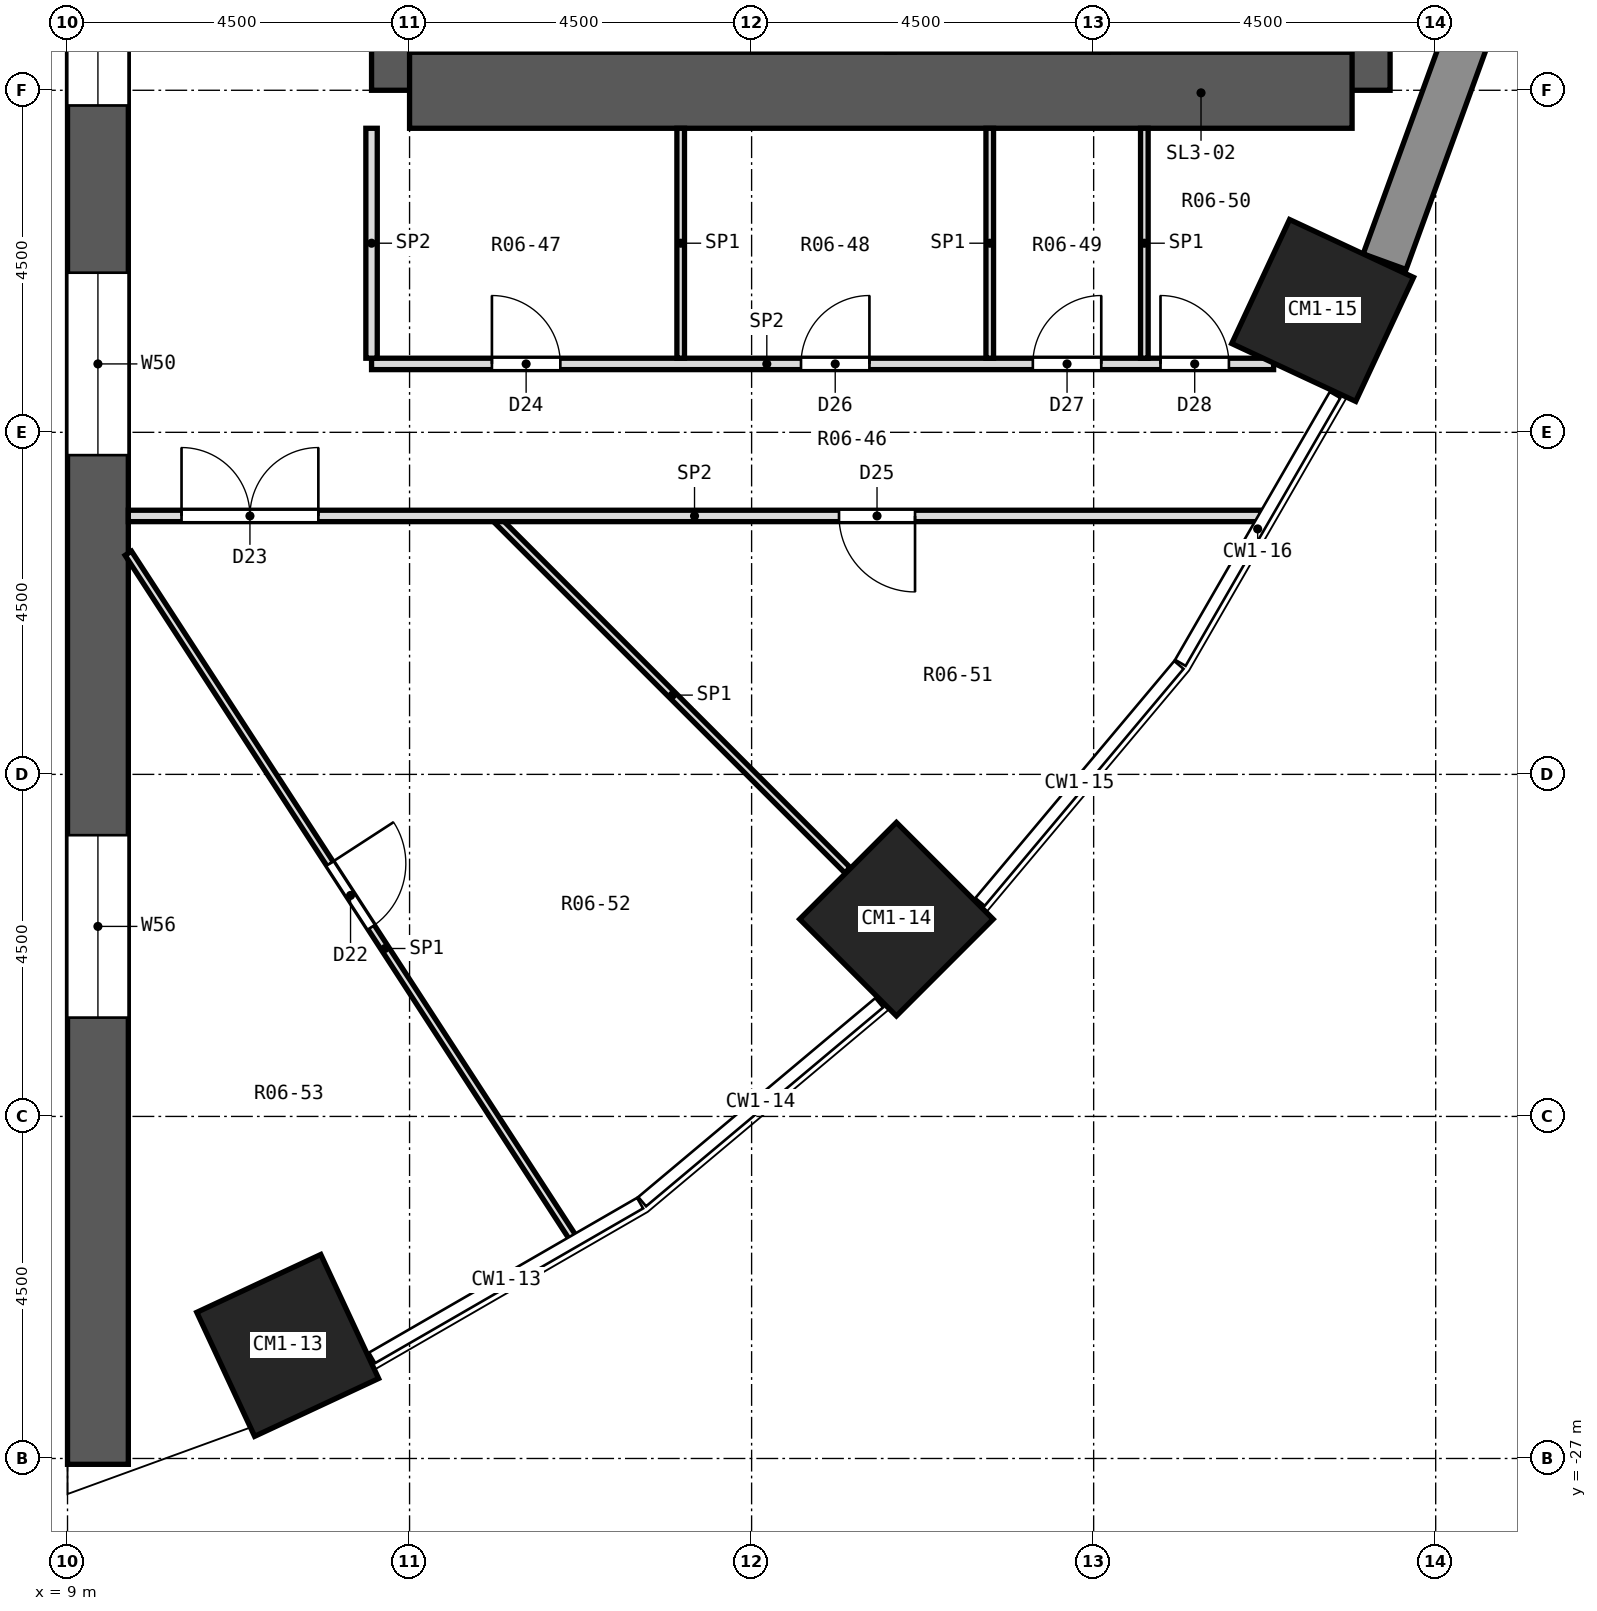
"""IFC4 building model, lengths in metres.
Left out: names, types, materials, properties, quantities, classifications, styles, units other than length and angle.
Written with IfcOpenShell. Run it as: python <this file> out.ifc"""

import sys

from ifc_helpers import new_model, si_unit, direction, frame, frame_2d, origin, origin_2d, place, context, subcontext, project, spatial, polyline, rectangle, outline, extrude, element, fill, save


model = new_model("IFC4")
c1 = context("Model", 3, precision=1e-05, world=origin(), true_north=direction((0.0, 1.0)))
c2 = subcontext(c1, "Body", "Model", "MODEL_VIEW")
j1 = project(units=[si_unit("LENGTHUNIT", "METRE"), si_unit("PLANEANGLEUNIT", "RADIAN")], contexts=[c1])
p1 = place(None, origin())
s1 = spatial("IfcSite", under=j1, at=p1, CompositionType="ELEMENT")
p2 = place(p1, origin())
s2 = spatial("IfcBuilding", under=s1, at=p2, CompositionType="ELEMENT")
p3 = place(p2, frame((0.0, 0.0, 13.4)))
s3 = spatial("IfcBuildingStorey", under=s2, at=p3, CompositionType="ELEMENT", Elevation=13.4)
for number, where, z_axis, x_axis in (
    (1, (11.897, -25.512, 0.0), (0.0, 0.0, 1.0), (0.423, -0.906, 0.0)),
    (2, (19.905, -19.905, 0.0), (0.0, 0.0, 1.0), (0.707, -0.707, 0.0)),
    (3, (25.512, -11.897, 0.0), (0.0, 0.0, 1.0), (0.906, -0.423, 0.0)),
):
    element("IfcColumn", number, at=place(p3, frame(where, z_axis=z_axis, x_axis=x_axis)), inside=s3, PredefinedType="COLUMN", context=c2, shape_type="SweptSolid", body=[
        extrude(rectangle(XDim=1.8, YDim=1.8, at=origin_2d()), origin(), (0.0, 0.0, 1.0), 4.2),
    ])
p4 = place(p3, frame((13.5, -9.0, 0.0), z_axis=(0.0, 0.0, 1.0), x_axis=(0.0, 1.0, 0.0)))
e4 = element("IfcWall", 4, at=p4, inside=s3, PredefinedType="SHEAR", context=c2, shape_type="SweptSolid", body=[
    extrude(rectangle(XDim=18.0, YDim=1.0, at=frame_2d((9.0, 0.0))), origin(), (0.0, 0.0, 1.0), 4.2),
])
p5 = place(p4, frame((15.4, 0.0, 0.0)))
e5 = element("IfcOpeningElement", 5, at=p5, cuts=e4, PredefinedType="OPENING", context=c2, shape_type="SweptSolid", body=[
    extrude(rectangle(XDim=1.2, YDim=2.1, at=frame_2d((0.6, 1.05))), frame((0.0, 0.512, 0.0), z_axis=(0.0, -1.0, 0.0), x_axis=(1.0, 0.0, 0.0)), (0.0, 0.0, 1.0), 1.024),
])
p6 = place(p4, frame((1.4, 0.0, 0.0)))
e6 = element("IfcOpeningElement", 6, at=p6, cuts=e4, PredefinedType="OPENING", context=c2, shape_type="SweptSolid", body=[
    extrude(rectangle(XDim=1.2, YDim=2.1, at=frame_2d((0.6, 1.05))), frame((0.0, 0.512, 0.0), z_axis=(0.0, -1.0, 0.0), x_axis=(1.0, 0.0, 0.0)), (0.0, 0.0, 1.0), 1.024),
])
p7 = place(p4, frame((7.5, 0.0, 0.0)))
e7 = element("IfcOpeningElement", 7, at=p7, cuts=e4, PredefinedType="OPENING", context=c2, shape_type="SweptSolid", body=[
    extrude(rectangle(XDim=3.0, YDim=2.4, at=frame_2d((1.5, 1.2))), frame((0.0, 0.512, 0.0), z_axis=(0.0, -1.0, 0.0), x_axis=(1.0, 0.0, 0.0)), (0.0, 0.0, 1.0), 1.024),
])
p8 = place(p3, frame((25.9, -9.0, 0.0), z_axis=(0.0, 0.0, 1.0), x_axis=(0.0, 1.0, 0.0)))
e8 = element("IfcWall", 8, at=p8, inside=s3, PredefinedType="SHEAR", context=c2, shape_type="SweptSolid", body=[
    extrude(rectangle(XDim=18.0, YDim=1.0, at=frame_2d((9.0, 0.0))), origin(), (0.0, 0.0, 1.0), 4.2),
])
p9 = place(p3, frame((13.5, -9.0, 0.0), z_axis=(0.0, 0.0, 1.0), x_axis=(1.0, 0.0, 0.0)))
e9 = element("IfcWall", 9, at=p9, inside=s3, PredefinedType="SHEAR", context=c2, shape_type="SweptSolid", body=[
    extrude(rectangle(XDim=12.4, YDim=1.0, at=frame_2d((6.2, 0.0))), origin(), (0.0, 0.0, 1.0), 4.2),
])
p10 = place(p3, frame((9.4, -27.077, 0.0), z_axis=(0.0, 0.0, 1.0), x_axis=(0.0, 1.0, 0.0)))
e10 = element("IfcWall", 10, at=p10, inside=s3, PredefinedType="SHEAR", context=c2, shape_type="SweptSolid", body=[
    extrude(rectangle(XDim=54.154, YDim=0.8, at=frame_2d((27.077, 0.0))), origin(), (0.0, 0.0, 1.0), 4.2),
])
p11 = place(p10, frame((13.277, 0.0, 0.9)))
e11 = element("IfcOpeningElement", 11, at=p11, cuts=e10, PredefinedType="OPENING", context=c2, shape_type="SweptSolid", body=[
    extrude(rectangle(XDim=2.4, YDim=2.1, at=frame_2d((1.2, 1.05))), frame((0.0, 0.412, 0.0), z_axis=(0.0, -1.0, 0.0), x_axis=(1.0, 0.0, 0.0)), (0.0, 0.0, 1.0), 0.824),
])
p12 = place(p10, frame((17.877, 0.0, 0.9)))
e12 = element("IfcOpeningElement", 12, at=p12, cuts=e10, PredefinedType="OPENING", context=c2, shape_type="SweptSolid", body=[
    extrude(rectangle(XDim=2.4, YDim=2.1, at=frame_2d((1.2, 1.05))), frame((0.0, 0.412, 0.0), z_axis=(0.0, -1.0, 0.0), x_axis=(1.0, 0.0, 0.0)), (0.0, 0.0, 1.0), 0.824),
])
p13 = place(p10, frame((22.477, 0.0, 0.9)))
e13 = element("IfcOpeningElement", 13, at=p13, cuts=e10, PredefinedType="OPENING", context=c2, shape_type="SweptSolid", body=[
    extrude(rectangle(XDim=2.4, YDim=2.1, at=frame_2d((1.2, 1.05))), frame((0.0, 0.412, 0.0), z_axis=(0.0, -1.0, 0.0), x_axis=(1.0, 0.0, 0.0)), (0.0, 0.0, 1.0), 0.824),
])
p14 = place(p10, frame((29.277, 0.0, 0.9)))
e14 = element("IfcOpeningElement", 14, at=p14, cuts=e10, PredefinedType="OPENING", context=c2, shape_type="SweptSolid", body=[
    extrude(rectangle(XDim=2.4, YDim=2.1, at=frame_2d((1.2, 1.05))), frame((0.0, 0.412, 0.0), z_axis=(0.0, -1.0, 0.0), x_axis=(1.0, 0.0, 0.0)), (0.0, 0.0, 1.0), 0.824),
])
p15 = place(p10, frame((33.877, 0.0, 0.9)))
e15 = element("IfcOpeningElement", 15, at=p15, cuts=e10, PredefinedType="OPENING", context=c2, shape_type="SweptSolid", body=[
    extrude(rectangle(XDim=2.4, YDim=2.1, at=frame_2d((1.2, 1.05))), frame((0.0, 0.412, 0.0), z_axis=(0.0, -1.0, 0.0), x_axis=(1.0, 0.0, 0.0)), (0.0, 0.0, 1.0), 0.824),
])
p16 = place(p10, frame((38.477, 0.0, 0.9)))
e16 = element("IfcOpeningElement", 16, at=p16, cuts=e10, PredefinedType="OPENING", context=c2, shape_type="SweptSolid", body=[
    extrude(rectangle(XDim=2.4, YDim=2.1, at=frame_2d((1.2, 1.05))), frame((0.0, 0.412, 0.0), z_axis=(0.0, -1.0, 0.0), x_axis=(1.0, 0.0, 0.0)), (0.0, 0.0, 1.0), 0.824),
])
p17 = place(p10, frame((5.877, 0.0, 0.9)))
e17 = element("IfcOpeningElement", 17, at=p17, cuts=e10, PredefinedType="OPENING", context=c2, shape_type="SweptSolid", body=[
    extrude(rectangle(XDim=2.4, YDim=2.1, at=frame_2d((1.2, 1.05))), frame((0.0, 0.412, 0.0), z_axis=(0.0, -1.0, 0.0), x_axis=(1.0, 0.0, 0.0)), (0.0, 0.0, 1.0), 0.824),
])
p18 = place(p10, frame((45.877, 0.0, 0.9)))
e18 = element("IfcOpeningElement", 18, at=p18, cuts=e10, PredefinedType="OPENING", context=c2, shape_type="SweptSolid", body=[
    extrude(rectangle(XDim=2.4, YDim=2.1, at=frame_2d((1.2, 1.05))), frame((0.0, 0.412, 0.0), z_axis=(0.0, -1.0, 0.0), x_axis=(1.0, 0.0, 0.0)), (0.0, 0.0, 1.0), 0.824),
])
p19 = place(p3, frame((26.328, -11.255, 0.0), z_axis=(0.0, 0.0, 1.0), x_axis=(0.342034744565, 0.939687306241, 0.0)))
e19 = element("IfcWall", 19, at=p19, inside=s3, PredefinedType="SOLIDWALL", context=c2, shape_type="SweptSolid", body=[
    extrude(rectangle(XDim=4.099, YDim=0.6, at=frame_2d((2.05, 0.0))), origin(), (0.0, 0.0, 1.0), 3.65),
])
p20 = place(p3, frame((11.631, -26.482, 0.0), z_axis=(0.342026905008, -0.939688050207, 0.001991117406), x_axis=(-0.93968991291, -0.342027583063, -3.2668e-08)))
e20 = element("IfcWall", 20, at=p20, inside=s3, PredefinedType="SOLIDWALL", context=c2, shape_type="SweptSolid", body=[
    extrude(outline(polyline([(0.0, 0.0), (2.81, 2.168e-19), (3.467, -8.514e-08), (3.745, -0.523), (3.745, -3.65), (3.745, -4.2), (2.81, -4.2), (2.81, -3.65), (-4.403e-05, -3.65), (0.0, 0.0)])), origin(), (0.0, 0.0, -1.0), 0.38),
])
p21 = place(p3, frame((9.8, -15.091, 0.0), z_axis=(0.0, 0.0, 1.0), x_axis=(0.544662159115, -0.838655550526, 0.0)))
e21 = element("IfcWall", 21, at=p21, inside=s3, PredefinedType="PARTITIONING", context=c2, shape_type="SweptSolid", body=[
    extrude(rectangle(XDim=10.735, YDim=0.1, at=frame_2d((5.367, 0.0))), origin(), (0.0, 0.0, 1.0), 3.65),
])
p22 = place(p21, frame((4.867, 0.0, 0.0)))
e22 = element("IfcOpeningElement", 22, at=p22, cuts=e21, PredefinedType="OPENING", context=c2, shape_type="SweptSolid", body=[
    extrude(rectangle(XDim=1.0, YDim=2.1, at=frame_2d((0.5, 1.05))), frame((0.0, 0.062, 0.0), z_axis=(0.0, -1.0, 0.0), x_axis=(1.0, 0.0, 0.0)), (0.0, 0.0, 1.0), 0.124),
])
p23 = place(p3, frame((14.653, -14.653, 0.0), z_axis=(0.0, 0.0, 1.0), x_axis=(0.707200424069, -0.707013125901, 0.0)))
e23 = element("IfcWall", 23, at=p23, inside=s3, PredefinedType="PARTITIONING", context=c2, shape_type="SweptSolid", body=[
    extrude(rectangle(XDim=6.517, YDim=0.1, at=frame_2d((3.259, 0.0))), origin(), (0.0, 0.0, 1.0), 3.65),
])
p24 = place(p3, frame((9.8, -14.6, 0.0), z_axis=(0.0, 0.0, 1.0), x_axis=(1.0, 0.0, 0.0)))
e24 = element("IfcWall", 24, at=p24, inside=s3, PredefinedType="PARTITIONING", context=c2, shape_type="SweptSolid", body=[
    extrude(rectangle(XDim=14.898, YDim=0.15, at=frame_2d((7.449, 0.0))), origin(), (0.0, 0.0, 1.0), 3.65),
])
p25 = place(p24, frame((0.7, 0.0, 0.0)))
e25 = element("IfcOpeningElement", 25, at=p25, cuts=e24, PredefinedType="OPENING", context=c2, shape_type="SweptSolid", body=[
    extrude(rectangle(XDim=1.8, YDim=2.1, at=frame_2d((0.9, 1.05))), frame((0.0, 0.087, 0.0), z_axis=(0.0, -1.0, 0.0), x_axis=(1.0, 0.0, 0.0)), (0.0, 0.0, 1.0), 0.174),
])
p26 = place(p24, frame((9.35, 0.0, 0.0)))
e26 = element("IfcOpeningElement", 26, at=p26, cuts=e24, PredefinedType="OPENING", context=c2, shape_type="SweptSolid", body=[
    extrude(rectangle(XDim=1.0, YDim=2.1, at=frame_2d((0.5, 1.05))), frame((0.0, 0.087, 0.0), z_axis=(0.0, -1.0, 0.0), x_axis=(1.0, 0.0, 0.0)), (0.0, 0.0, 1.0), 0.174),
])
p27 = place(p3, frame((13.0, -12.6, 0.0), z_axis=(0.0, 0.0, 1.0), x_axis=(1.0, 0.0, 0.0)))
e27 = element("IfcWall", 27, at=p27, inside=s3, PredefinedType="PARTITIONING", context=c2, shape_type="SweptSolid", body=[
    extrude(rectangle(XDim=11.867, YDim=0.15, at=frame_2d((5.934, 0.0))), origin(), (0.0, 0.0, 1.0), 3.65),
])
p28 = place(p27, frame((1.583, 0.0, 0.0)))
e28 = element("IfcOpeningElement", 28, at=p28, cuts=e27, PredefinedType="OPENING", context=c2, shape_type="SweptSolid", body=[
    extrude(rectangle(XDim=0.9, YDim=2.1, at=frame_2d((0.45, 1.05))), frame((0.0, 0.087, 0.0), z_axis=(0.0, -1.0, 0.0), x_axis=(1.0, 0.0, 0.0)), (0.0, 0.0, 1.0), 0.174),
])
p29 = place(p27, frame((5.65, 0.0, 0.0)))
e29 = element("IfcOpeningElement", 29, at=p29, cuts=e27, PredefinedType="OPENING", context=c2, shape_type="SweptSolid", body=[
    extrude(rectangle(XDim=0.9, YDim=2.1, at=frame_2d((0.45, 1.05))), frame((0.0, 0.087, 0.0), z_axis=(0.0, -1.0, 0.0), x_axis=(1.0, 0.0, 0.0)), (0.0, 0.0, 1.0), 0.174),
])
p30 = place(p27, frame((8.7, 0.0, 0.0)))
e30 = element("IfcOpeningElement", 30, at=p30, cuts=e27, PredefinedType="OPENING", context=c2, shape_type="SweptSolid", body=[
    extrude(rectangle(XDim=0.9, YDim=2.1, at=frame_2d((0.45, 1.05))), frame((0.0, 0.087, 0.0), z_axis=(0.0, -1.0, 0.0), x_axis=(1.0, 0.0, 0.0)), (0.0, 0.0, 1.0), 0.174),
])
p31 = place(p27, frame((10.379, 0.0, 0.0)))
e31 = element("IfcOpeningElement", 31, at=p31, cuts=e27, PredefinedType="OPENING", context=c2, shape_type="SweptSolid", body=[
    extrude(rectangle(XDim=0.9, YDim=2.1, at=frame_2d((0.45, 1.05))), frame((0.0, 0.087, 0.0), z_axis=(0.0, -1.0, 0.0), x_axis=(1.0, 0.0, 0.0)), (0.0, 0.0, 1.0), 0.174),
])
for number, where, z_axis, x_axis in (
    (32, (23.167, -12.525, 0.0), (0.0, 0.0, 1.0), (0.0, 1.0, 0.0)),
    (33, (21.133, -12.525, 0.0), (0.0, 0.0, 1.0), (0.0, 1.0, 0.0)),
    (34, (17.067, -12.525, 0.0), (0.0, 0.0, 1.0), (0.0, 1.0, 0.0)),
):
    element("IfcWall", number, at=place(p3, frame(where, z_axis=z_axis, x_axis=x_axis)), inside=s3, PredefinedType="PARTITIONING", context=c2, shape_type="SweptSolid", body=[
        extrude(rectangle(XDim=3.025, YDim=0.1, at=frame_2d((1.512, 0.0))), origin(), (0.0, 0.0, 1.0), 3.65),
    ])
p32 = place(p3, frame((13.0, -12.525, 0.0), z_axis=(0.0, 0.0, 1.0), x_axis=(0.0, 1.0, 0.0)))
e35 = element("IfcWall", 35, at=p32, inside=s3, PredefinedType="PARTITIONING", context=c2, shape_type="SweptSolid", body=[
    extrude(rectangle(XDim=3.025, YDim=0.15, at=frame_2d((1.512, 0.0))), origin(), (0.0, 0.0, 1.0), 3.65),
])
p33 = place(p22, origin())
e36 = element("IfcDoor", 36, at=p33, inside=s3, OperationType="SINGLE_SWING_LEFT", PredefinedType="DOOR", context=c2, shape_type="SweptSolid", body=[
    extrude(rectangle(XDim=1.0, YDim=2.1, at=frame_2d((0.5, 1.05))), frame((0.0, 0.025, 0.0), z_axis=(0.0, -1.0, 0.0), x_axis=(1.0, 0.0, 0.0)), (0.0, 0.0, 1.0), 0.05),
])
fill(e22, e36)
p34 = place(p25, origin())
e37 = element("IfcDoor", 37, at=p34, inside=s3, OperationType="DOUBLE_DOOR_SINGLE_SWING", PredefinedType="DOOR", context=c2, shape_type="SweptSolid", body=[
    extrude(rectangle(XDim=1.8, YDim=2.1, at=frame_2d((0.9, 1.05))), frame((0.0, 0.025, 0.0), z_axis=(0.0, -1.0, 0.0), x_axis=(1.0, 0.0, 0.0)), (0.0, 0.0, 1.0), 0.05),
])
fill(e25, e37)
p35 = place(p28, origin())
e38 = element("IfcDoor", 38, at=p35, inside=s3, OperationType="SINGLE_SWING_LEFT", PredefinedType="DOOR", context=c2, shape_type="SweptSolid", body=[
    extrude(rectangle(XDim=0.9, YDim=2.1, at=frame_2d((0.45, 1.05))), frame((0.0, 0.025, 0.0), z_axis=(0.0, -1.0, 0.0), x_axis=(1.0, 0.0, 0.0)), (0.0, 0.0, 1.0), 0.05),
])
fill(e28, e38)
p36 = place(p26, frame((1.0, 0.0, 0.0), z_axis=(0.0, 0.0, 1.0), x_axis=(-1.0, 0.0, 0.0)))
e39 = element("IfcDoor", 39, at=p36, inside=s3, OperationType="SINGLE_SWING_LEFT", PredefinedType="DOOR", context=c2, shape_type="SweptSolid", body=[
    extrude(rectangle(XDim=1.0, YDim=2.1, at=frame_2d((0.5, 1.05))), frame((0.0, 0.025, 0.0), z_axis=(0.0, -1.0, 0.0), x_axis=(1.0, 0.0, 0.0)), (0.0, 0.0, 1.0), 0.05),
])
fill(e26, e39)
p37 = place(p29, origin())
e40 = element("IfcDoor", 40, at=p37, inside=s3, OperationType="SINGLE_SWING_RIGHT", PredefinedType="DOOR", context=c2, shape_type="SweptSolid", body=[
    extrude(rectangle(XDim=0.9, YDim=2.1, at=frame_2d((0.45, 1.05))), frame((0.0, 0.025, 0.0), z_axis=(0.0, -1.0, 0.0), x_axis=(1.0, 0.0, 0.0)), (0.0, 0.0, 1.0), 0.05),
])
fill(e29, e40)
p38 = place(p30, origin())
e41 = element("IfcDoor", 41, at=p38, inside=s3, OperationType="SINGLE_SWING_RIGHT", PredefinedType="DOOR", context=c2, shape_type="SweptSolid", body=[
    extrude(rectangle(XDim=0.9, YDim=2.1, at=frame_2d((0.45, 1.05))), frame((0.0, 0.025, 0.0), z_axis=(0.0, -1.0, 0.0), x_axis=(1.0, 0.0, 0.0)), (0.0, 0.0, 1.0), 0.05),
])
fill(e30, e41)
p39 = place(p31, origin())
e42 = element("IfcDoor", 42, at=p39, inside=s3, OperationType="SINGLE_SWING_LEFT", PredefinedType="DOOR", context=c2, shape_type="SweptSolid", body=[
    extrude(rectangle(XDim=0.9, YDim=2.1, at=frame_2d((0.45, 1.05))), frame((0.0, 0.025, 0.0), z_axis=(0.0, -1.0, 0.0), x_axis=(1.0, 0.0, 0.0)), (0.0, 0.0, 1.0), 0.05),
])
fill(e31, e42)
p40 = place(p11, origin())
e43 = element("IfcWindow", 43, at=p40, inside=s3, PartitioningType="SINGLE_PANEL", PredefinedType="WINDOW", context=c2, shape_type="SweptSolid", body=[
    extrude(rectangle(XDim=2.4, YDim=2.1, at=frame_2d((1.2, 1.05))), frame((0.0, 0.03, 0.0), z_axis=(0.0, -1.0, 0.0), x_axis=(1.0, 0.0, 0.0)), (0.0, 0.0, 1.0), 0.06),
])
fill(e11, e43)
p41 = place(p12, origin())
e44 = element("IfcWindow", 44, at=p41, inside=s3, PartitioningType="SINGLE_PANEL", PredefinedType="WINDOW", context=c2, shape_type="SweptSolid", body=[
    extrude(rectangle(XDim=2.4, YDim=2.1, at=frame_2d((1.2, 1.05))), frame((0.0, 0.03, 0.0), z_axis=(0.0, -1.0, 0.0), x_axis=(1.0, 0.0, 0.0)), (0.0, 0.0, 1.0), 0.06),
])
fill(e12, e44)
p42 = place(p17, origin())
e45 = element("IfcWindow", 45, at=p42, inside=s3, PartitioningType="SINGLE_PANEL", PredefinedType="WINDOW", context=c2, shape_type="SweptSolid", body=[
    extrude(rectangle(XDim=2.4, YDim=2.1, at=frame_2d((1.2, 1.05))), frame((0.0, 0.03, 0.0), z_axis=(0.0, -1.0, 0.0), x_axis=(1.0, 0.0, 0.0)), (0.0, 0.0, 1.0), 0.06),
])
fill(e17, e45)
save(model, sys.argv[1])
